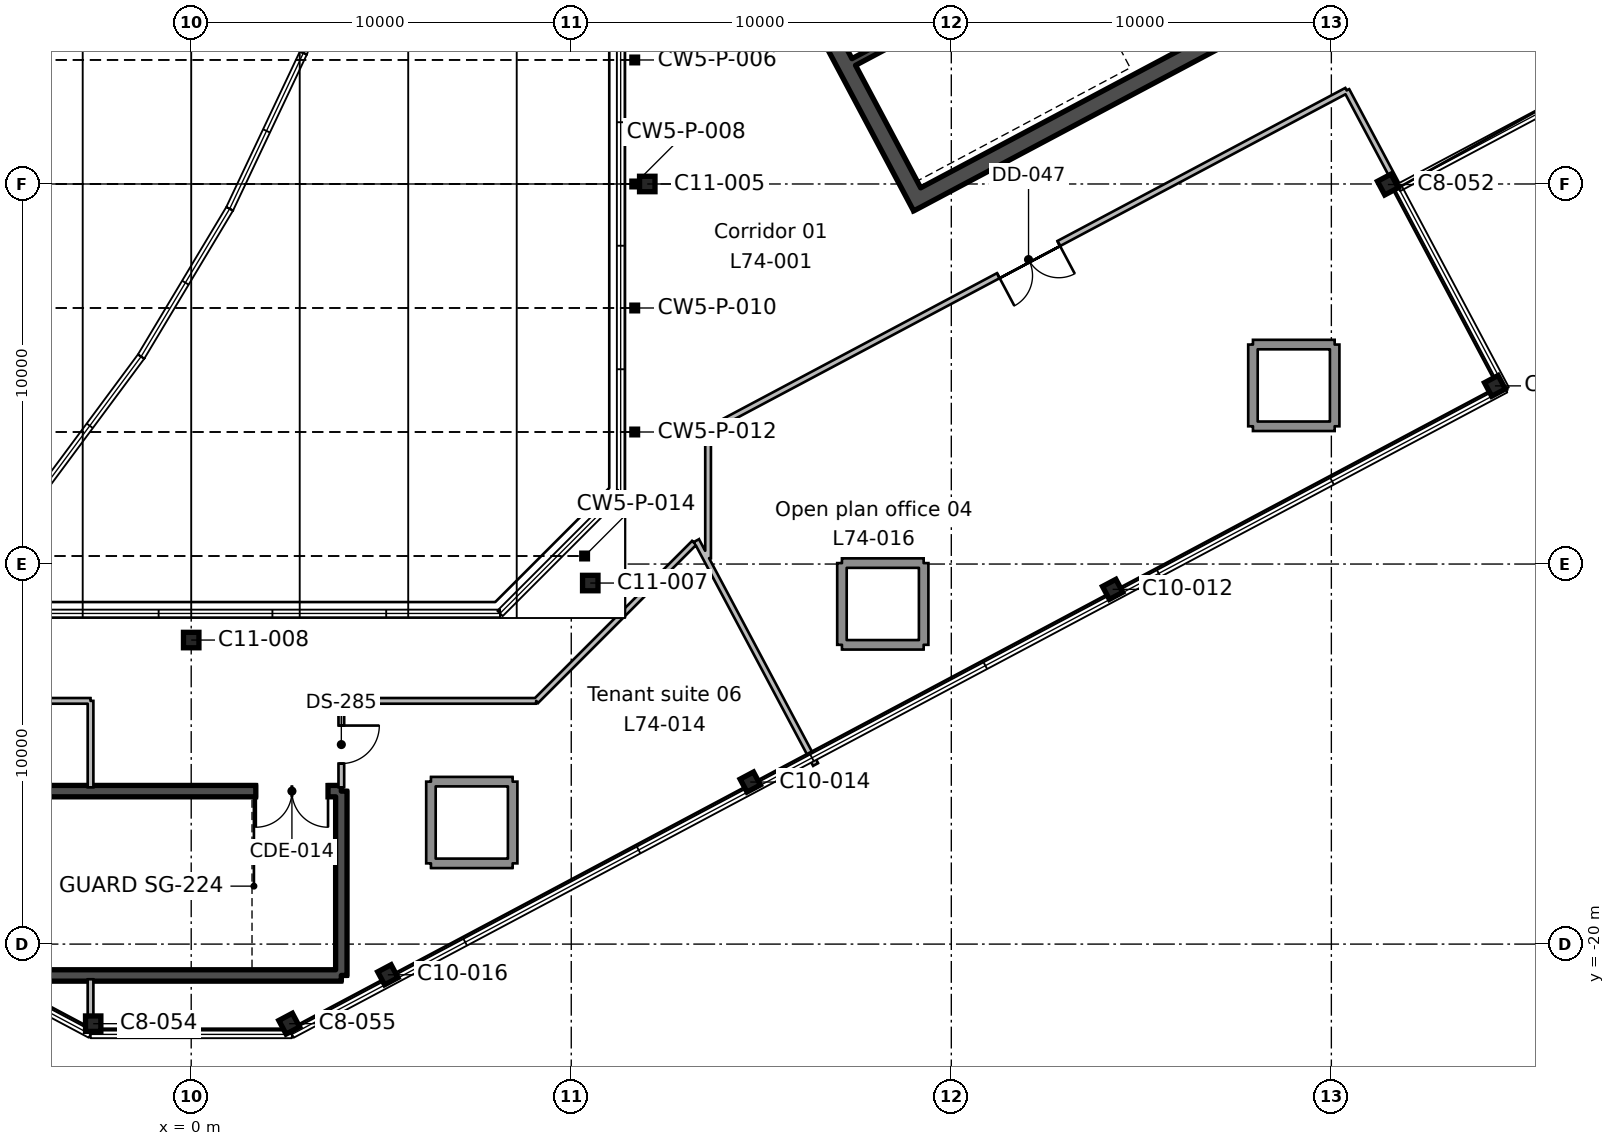
"""IFC4 building model, lengths in metres.
Left out: names, types, materials, properties, quantities, classifications, styles, units other than length and angle.
Written with IfcOpenShell. Run it as: python <this file> out.ifc"""

import sys

from ifc_helpers import new_model, si_unit, direction, frame, frame_2d, origin, origin_2d, place, context, subcontext, project, spatial, rectangle, hollow_rectangle, i_section, extrude, element, fill, save


model = new_model("IFC4")
c1 = context("Model", 3, precision=1e-05, world=origin(), true_north=direction((0.0, 1.0)))
c2 = subcontext(c1, "Body", "Model", "MODEL_VIEW")
j1 = project(units=[si_unit("LENGTHUNIT", "METRE"), si_unit("PLANEANGLEUNIT", "RADIAN")], contexts=[c1])
p1 = place(None, origin())
s1 = spatial("IfcSite", under=j1, at=p1, CompositionType="ELEMENT")
p2 = place(p1, origin())
s2 = spatial("IfcBuilding", under=s1, at=p2, CompositionType="ELEMENT")
p3 = place(p2, frame((0.0, 0.0, 324.3)))
s3 = spatial("IfcBuildingStorey", under=s2, at=p3, CompositionType="ELEMENT", Elevation=324.3)
for number, where, z_axis, x_axis in (
    (1, (-2.579, -22.094, 0.0), (0.0, 0.0, 1.0), (1.0, 0.0, 0.0)),
    (2, (2.579, -22.094, 0.0), (0.0, 0.0, 1.0), (0.883, 0.469, 0.0)),
):
    element("IfcColumn", number, at=place(p3, frame(where, z_axis=z_axis, x_axis=x_axis)), inside=s3, PredefinedType="COLUMN", context=c2, shape_type="SweptSolid", body=[
        extrude(i_section(OverallWidth=0.404, OverallDepth=0.406, WebThickness=0.027, FlangeThickness=0.044, FilletRadius=0.015, at=origin_2d()), origin(), (0.0, 0.0, 1.0), 3.9),
    ])
for number, where, z_axis, x_axis in (
    (3, (5.174, -20.807, 0.0), (0.0, 0.0, 1.0), (0.883, 0.469, 0.0)),
    (4, (14.71, -15.736, 0.0), (0.0, 0.0, 1.0), (0.883, 0.469, 0.0)),
):
    element("IfcColumn", number, at=place(p3, frame(where, z_axis=z_axis, x_axis=x_axis)), inside=s3, PredefinedType="COLUMN", context=c2, shape_type="SweptSolid", body=[
        extrude(i_section(OverallWidth=0.399, OverallDepth=0.386, WebThickness=0.021, FlangeThickness=0.033, FilletRadius=0.015, at=origin_2d()), origin(), (0.0, 0.0, 1.0), 3.9),
    ])
p4 = place(p3, frame((0.0, -12.0, 0.0), z_axis=(0.0, 0.0, 1.0), x_axis=(1.0, 0.0, 0.0)))
e5 = element("IfcColumn", 5, at=p4, inside=s3, PredefinedType="COLUMN", context=c2, shape_type="SweptSolid", body=[
    extrude(hollow_rectangle(XDim=0.406, YDim=0.406, WallThickness=0.009, InnerFilletRadius=0.004, OuterFilletRadius=0.013, at=origin_2d()), origin(), (0.0, 0.0, 1.0), 3.9),
])
p5 = place(p3, frame((24.245, -10.666, 0.0), z_axis=(0.0, 0.0, 1.0), x_axis=(0.882947592859, 0.469471562786, 0.0)))
e6 = element("IfcColumn", 6, at=p5, inside=s3, PredefinedType="COLUMN", context=c2, shape_type="SweptSolid", body=[
    extrude(i_section(OverallWidth=0.399, OverallDepth=0.386, WebThickness=0.021, FlangeThickness=0.033, FilletRadius=0.015, at=origin_2d()), origin(), (0.0, 0.0, 1.0), 3.9),
])
p6 = place(p3, frame((10.5, -10.5, 0.0), z_axis=(0.0, 0.0, 1.0), x_axis=(1.0, 0.0, 0.0)))
e7 = element("IfcColumn", 7, at=p6, inside=s3, PredefinedType="COLUMN", context=c2, shape_type="SweptSolid", body=[
    extrude(hollow_rectangle(XDim=0.406, YDim=0.406, WallThickness=0.009, InnerFilletRadius=0.004, OuterFilletRadius=0.013, at=origin_2d()), origin(), (0.0, 0.0, 1.0), 3.9),
])
for number, where, z_axis, x_axis in (
    (8, (34.304, -5.312, 0.0), (0.0, 0.0, 1.0), (-0.469, 0.883, 0.0)),
    (9, (31.487, -0.014, 0.0), (0.0, 0.0, 1.0), (0.883, 0.469, 0.0)),
):
    element("IfcColumn", number, at=place(p3, frame(where, z_axis=z_axis, x_axis=x_axis)), inside=s3, PredefinedType="COLUMN", context=c2, shape_type="SweptSolid", body=[
        extrude(i_section(OverallWidth=0.404, OverallDepth=0.406, WebThickness=0.027, FlangeThickness=0.044, FilletRadius=0.015, at=origin_2d()), origin(), (0.0, 0.0, 1.0), 3.9),
    ])
p7 = place(p3, frame((12.0, 0.0, 0.0), z_axis=(0.0, 0.0, 1.0), x_axis=(1.0, 0.0, 0.0)))
e10 = element("IfcColumn", 10, at=p7, inside=s3, PredefinedType="COLUMN", context=c2, shape_type="SweptSolid", body=[
    extrude(hollow_rectangle(XDim=0.406, YDim=0.406, WallThickness=0.009, InnerFilletRadius=0.004, OuterFilletRadius=0.013, at=origin_2d()), origin(), (0.0, 0.0, 1.0), 3.9),
])
p8 = place(p3, frame((19.207, -0.604, 0.0), z_axis=(0.0, 0.0, 1.0), x_axis=(-0.469467968382, 0.882949504028, 0.0)))
e11 = element("IfcWall", 11, at=p8, inside=s3, PredefinedType="SHEAR", context=c2, shape_type="SweptSolid", body=[
    extrude(rectangle(XDim=19.1, YDim=0.45, at=frame_2d((9.55, 0.0))), origin(), (0.0, 0.0, 1.0), 3.9),
])
p9 = place(p8, frame((6.55, 0.0, 0.0)))
e12 = element("IfcOpeningElement", 12, at=p9, cuts=e11, PredefinedType="OPENING", context=c2, shape_type="SweptSolid", body=[
    extrude(rectangle(XDim=2.4, YDim=2.4, at=frame_2d((1.2, 1.2))), frame((0.0, 0.235, 0.0), z_axis=(0.0, -1.0, 0.0), x_axis=(1.0, 0.0, 0.0)), (0.0, 0.0, 1.0), 0.47),
])
p10 = place(p3, frame((19.3, -0.299, 0.0), z_axis=(0.0, 0.0, 1.0), x_axis=(0.88295276571, 0.46946183394, 0.0)))
e13 = element("IfcWall", 13, at=p10, inside=s3, PredefinedType="SHEAR", context=c2, shape_type="SweptSolid", body=[
    extrude(rectangle(XDim=20.2, YDim=0.45, at=frame_2d((10.1, 0.0))), origin(), (0.0, 0.0, 1.0), 3.9),
])
p11 = place(p3, frame((17.434, 3.21, 0.0), z_axis=(0.0, 0.0, 1.0), x_axis=(0.882940221191, 0.469485426614, 0.0)))
e14 = element("IfcWall", 14, at=p11, inside=s3, PredefinedType="SHEAR", context=c2, shape_type="SweptSolid", body=[
    extrude(rectangle(XDim=8.0, YDim=0.2, at=frame_2d((4.0, 0.0))), origin(), (0.0, 0.0, 1.0), 3.9),
])
p12 = place(p3, frame((3.95, -15.975, 0.0), z_axis=(0.0, 0.0, 1.0), x_axis=(0.0, -1.0, 0.0)))
e15 = element("IfcWall", 15, at=p12, inside=s3, PredefinedType="SHEAR", context=c2, shape_type="SweptSolid", body=[
    extrude(rectangle(XDim=4.85, YDim=0.3, at=frame_2d((2.425, 0.0))), origin(), (0.0, 0.0, 1.0), 3.9),
])
p13 = place(p3, frame((3.95, -20.825, 0.0), z_axis=(0.0, 0.0, 1.0), x_axis=(-1.0, 0.0, 0.0)))
e16 = element("IfcWall", 16, at=p13, inside=s3, PredefinedType="SHEAR", context=c2, shape_type="SweptSolid", body=[
    extrude(rectangle(XDim=8.3, YDim=0.3, at=frame_2d((4.15, 0.0))), origin(), (0.0, 0.0, 1.0), 3.9),
])
p14 = place(p3, frame((-4.35, -15.975, 0.0), z_axis=(0.0, 0.0, 1.0), x_axis=(1.0, 0.0, 0.0)))
e17 = element("IfcWall", 17, at=p14, inside=s3, PredefinedType="SHEAR", context=c2, shape_type="SweptSolid", body=[
    extrude(rectangle(XDim=8.3, YDim=0.3, at=frame_2d((4.15, 0.0))), origin(), (0.0, 0.0, 1.0), 3.9),
])
p15 = place(p14, frame((6.05, 0.0, 0.0)))
e18 = element("IfcOpeningElement", 18, at=p15, cuts=e17, PredefinedType="OPENING", context=c2, shape_type="SweptSolid", body=[
    extrude(rectangle(XDim=1.9, YDim=2.1, at=frame_2d((0.95, 1.05))), frame((0.0, 0.16, 0.0), z_axis=(0.0, -1.0, 0.0), x_axis=(1.0, 0.0, 0.0)), (0.0, 0.0, 1.0), 0.32),
])
p16 = place(p3, frame((8.458, -15.726, 3.9), z_axis=(0.0, 0.0, 1.0), x_axis=(0.0, -1.0, 0.0)))
e19 = element("IfcWall", 19, at=p16, inside=s3, PredefinedType="STANDARD", context=c2, shape_type="SweptSolid", body=[
    extrude(rectangle(XDim=2.15, YDim=0.25, at=frame_2d((1.075, 0.0))), origin(), (0.0, 0.0, 1.0), 0.6),
])
p17 = place(p3, frame((8.458, -17.875, 3.9), z_axis=(0.0, 0.0, 1.0), x_axis=(-1.0, 0.0, 0.0)))
e20 = element("IfcWall", 20, at=p17, inside=s3, PredefinedType="STANDARD", context=c2, shape_type="SweptSolid", body=[
    extrude(rectangle(XDim=2.15, YDim=0.25, at=frame_2d((1.075, 0.0))), origin(), (0.0, 0.0, 1.0), 0.6),
])
p18 = place(p3, frame((6.308, -17.875, 3.9), z_axis=(0.0, 0.0, 1.0), x_axis=(0.0, 1.0, 0.0)))
e21 = element("IfcWall", 21, at=p18, inside=s3, PredefinedType="STANDARD", context=c2, shape_type="SweptSolid", body=[
    extrude(rectangle(XDim=2.15, YDim=0.25, at=frame_2d((1.075, 0.0))), origin(), (0.0, 0.0, 1.0), 0.6),
])
p19 = place(p3, frame((6.308, -15.726, 3.9), z_axis=(0.0, 0.0, 1.0), x_axis=(1.0, 0.0, 0.0)))
e22 = element("IfcWall", 22, at=p19, inside=s3, PredefinedType="STANDARD", context=c2, shape_type="SweptSolid", body=[
    extrude(rectangle(XDim=2.15, YDim=0.25, at=frame_2d((1.075, 0.0))), origin(), (0.0, 0.0, 1.0), 0.6),
])
p20 = place(p3, frame((19.272, -9.975, 3.9), z_axis=(0.0, 0.0, 1.0), x_axis=(0.0, -1.0, 0.0)))
e23 = element("IfcWall", 23, at=p20, inside=s3, PredefinedType="STANDARD", context=c2, shape_type="SweptSolid", body=[
    extrude(rectangle(XDim=2.15, YDim=0.25, at=frame_2d((1.075, 0.0))), origin(), (0.0, 0.0, 1.0), 0.6),
])
p21 = place(p3, frame((19.272, -12.125, 3.9), z_axis=(0.0, 0.0, 1.0), x_axis=(-1.0, 0.0, 0.0)))
e24 = element("IfcWall", 24, at=p21, inside=s3, PredefinedType="STANDARD", context=c2, shape_type="SweptSolid", body=[
    extrude(rectangle(XDim=2.15, YDim=0.25, at=frame_2d((1.075, 0.0))), origin(), (0.0, 0.0, 1.0), 0.6),
])
p22 = place(p3, frame((17.122, -12.125, 3.9), z_axis=(0.0, 0.0, 1.0), x_axis=(0.0, 1.0, 0.0)))
e25 = element("IfcWall", 25, at=p22, inside=s3, PredefinedType="STANDARD", context=c2, shape_type="SweptSolid", body=[
    extrude(rectangle(XDim=2.15, YDim=0.25, at=frame_2d((1.075, 0.0))), origin(), (0.0, 0.0, 1.0), 0.6),
])
p23 = place(p3, frame((17.122, -9.975, 3.9), z_axis=(0.0, 0.0, 1.0), x_axis=(1.0, 0.0, 0.0)))
e26 = element("IfcWall", 26, at=p23, inside=s3, PredefinedType="STANDARD", context=c2, shape_type="SweptSolid", body=[
    extrude(rectangle(XDim=2.15, YDim=0.25, at=frame_2d((1.075, 0.0))), origin(), (0.0, 0.0, 1.0), 0.6),
])
for number, where, z_axis, x_axis in (
    (27, (30.087, -4.225, 3.9), (0.0, 0.0, 1.0), (0.0, -1.0, 0.0)),
    (28, (30.087, -6.375, 3.9), (0.0, 0.0, 1.0), (-1.0, 0.0, 0.0)),
    (29, (27.937, -6.375, 3.9), (0.0, 0.0, 1.0), (0.0, 1.0, 0.0)),
    (30, (27.937, -4.225, 3.9), (0.0, 0.0, 1.0), (1.0, 0.0, 0.0)),
):
    element("IfcWall", number, at=place(p3, frame(where, z_axis=z_axis, x_axis=x_axis)), inside=s3, PredefinedType="STANDARD", context=c2, shape_type="SweptSolid", body=[
        extrude(rectangle(XDim=2.15, YDim=0.25, at=frame_2d((1.075, 0.0))), origin(), (0.0, 0.0, 1.0), 0.6),
    ])
p24 = place(p3, frame((11.1, 8.042, 3.9), z_axis=(0.0, 0.0, 1.0), x_axis=(0.0, -1.0, 0.0)))
e31 = element("IfcWall", 31, at=p24, inside=s3, PredefinedType="STANDARD", context=c2, shape_type="SweptSolid", body=[
    extrude(rectangle(XDim=16.083, YDim=0.2, at=frame_2d((8.042, 0.0))), origin(), (0.0, 0.0, 1.0), 1.1),
])
p25 = place(p3, frame((11.1, -8.042, 3.9), z_axis=(0.0, 0.0, 1.0), x_axis=(-0.707106781187, -0.707106781187, 0.0)))
e32 = element("IfcWall", 32, at=p25, inside=s3, PredefinedType="STANDARD", context=c2, shape_type="SweptSolid", body=[
    extrude(rectangle(XDim=4.325, YDim=0.2, at=frame_2d((2.163, 0.0))), origin(), (0.0, 0.0, 1.0), 1.1),
])
p26 = place(p3, frame((8.042, -11.1, 3.9), z_axis=(0.0, 0.0, 1.0), x_axis=(-1.0, 0.0, 0.0)))
e33 = element("IfcWall", 33, at=p26, inside=s3, PredefinedType="STANDARD", context=c2, shape_type="SweptSolid", body=[
    extrude(rectangle(XDim=14.435, YDim=0.2, at=frame_2d((7.217, 0.0))), origin(), (0.0, 0.0, 1.0), 1.1),
])
p27 = place(p3, frame((-3.865, -8.31, 3.9), z_axis=(0.0, 0.0, 1.0), x_axis=(0.595701892523, 0.80320561206, 0.0)))
e34 = element("IfcWall", 34, at=p27, inside=s3, PredefinedType="STANDARD", context=c2, shape_type="SweptSolid", body=[
    extrude(rectangle(XDim=4.553, YDim=0.2, at=frame_2d((2.277, 0.0))), origin(), (0.0, 0.0, 1.0), 1.1),
])
p28 = place(p3, frame((-1.152, -4.653, 3.9), z_axis=(0.0, 0.0, 1.0), x_axis=(0.514109363487, 0.857724642514, 0.0)))
e35 = element("IfcWall", 35, at=p28, inside=s3, PredefinedType="STANDARD", context=c2, shape_type="SweptSolid", body=[
    extrude(rectangle(XDim=4.554, YDim=0.2, at=frame_2d((2.277, 0.0))), origin(), (0.0, 0.0, 1.0), 1.1),
])
p29 = place(p3, frame((1.189, -0.747, 3.9), z_axis=(0.0, 0.0, 1.0), x_axis=(0.427546938285, 0.903993150175, 0.0)))
e36 = element("IfcWall", 36, at=p29, inside=s3, PredefinedType="STANDARD", context=c2, shape_type="SweptSolid", body=[
    extrude(rectangle(XDim=4.553, YDim=0.2, at=frame_2d((2.277, 0.0))), origin(), (0.0, 0.0, 1.0), 1.1),
])
p30 = place(p3, frame((3.136, 3.369, 3.9), z_axis=(0.0, 0.0, 1.0), x_axis=(0.336900115649, 0.941540393226, 0.0)))
e37 = element("IfcWall", 37, at=p30, inside=s3, PredefinedType="STANDARD", context=c2, shape_type="SweptSolid", body=[
    extrude(rectangle(XDim=4.554, YDim=0.2, at=frame_2d((2.277, 0.0))), origin(), (0.0, 0.0, 1.0), 1.1),
])
for number, where, z_axis, x_axis in (
    (38, (10.351, -9.789, 3.9), (0.0, 0.0, 1.0), (1.0, 0.0, 0.0)),
    (39, (11.67, -6.526, 3.9), (0.0, 0.0, 1.0), (1.0, 0.0, 0.0)),
    (40, (11.67, -3.263, 3.9), (0.0, 0.0, 1.0), (1.0, 0.0, 0.0)),
    (41, (11.67, 0.0, 3.9), (0.0, 0.0, 1.0), (1.0, 0.0, 0.0)),
    (42, (11.67, 3.263, 3.9), (0.0, 0.0, 1.0), (1.0, 0.0, 0.0)),
):
    element("IfcColumn", number, at=place(p3, frame(where, z_axis=z_axis, x_axis=x_axis)), inside=s3, PredefinedType="COLUMN", context=c2, shape_type="SweptSolid", body=[
        extrude(hollow_rectangle(XDim=0.15, YDim=0.15, WallThickness=0.008, InnerFilletRadius=0.004, OuterFilletRadius=0.012, at=origin_2d()), origin(), (0.0, 0.0, 1.0), 2.45),
    ])
p31 = place(p3, frame((-2.649, -15.875, 0.0), z_axis=(0.0, 0.0, 1.0), x_axis=(0.0, 1.0, 0.0)))
e43 = element("IfcWall", 43, at=p31, inside=s3, PredefinedType="PARTITIONING", context=c2, shape_type="SweptSolid", body=[
    extrude(rectangle(XDim=2.275, YDim=0.15, at=frame_2d((1.137, 0.0))), origin(), (0.0, 0.0, 1.0), 3.5),
])
p32 = place(p3, frame((-2.649, -13.6, 0.0), z_axis=(0.0, 0.0, 1.0), x_axis=(-1.0, 0.0, 0.0)))
e44 = element("IfcWall", 44, at=p32, inside=s3, PredefinedType="PARTITIONING", context=c2, shape_type="SweptSolid", body=[
    extrude(rectangle(XDim=1.239, YDim=0.15, at=frame_2d((0.62, 0.0))), origin(), (0.0, 0.0, 1.0), 3.5),
])
p33 = place(p3, frame((-2.649, -20.925, 0.0), z_axis=(0.0, 0.0, 1.0), x_axis=(0.0, -1.0, 0.0)))
e45 = element("IfcWall", 45, at=p33, inside=s3, PredefinedType="PARTITIONING", context=c2, shape_type="SweptSolid", body=[
    extrude(rectangle(XDim=0.966, YDim=0.15, at=frame_2d((0.483, 0.0))), origin(), (0.0, 0.0, 1.0), 3.5),
])
p34 = place(p3, frame((3.95, -13.6, 0.0), z_axis=(0.0, 0.0, 1.0), x_axis=(0.0, -1.0, 0.0)))
e46 = element("IfcWall", 46, at=p34, inside=s3, PredefinedType="PARTITIONING", context=c2, shape_type="SweptSolid", body=[
    extrude(rectangle(XDim=2.275, YDim=0.15, at=frame_2d((1.137, 0.0))), origin(), (0.0, 0.0, 1.0), 3.5),
])
p35 = place(p34, frame((0.65, 0.0, 0.0)))
e47 = element("IfcOpeningElement", 47, at=p35, cuts=e46, PredefinedType="OPENING", context=c2, shape_type="SweptSolid", body=[
    extrude(rectangle(XDim=1.0, YDim=2.1, at=frame_2d((0.5, 1.05))), frame((0.0, 0.085, 0.0), z_axis=(0.0, -1.0, 0.0), x_axis=(1.0, 0.0, 0.0)), (0.0, 0.0, 1.0), 0.17),
])
p36 = place(p3, frame((13.233, -9.444, 0.0), z_axis=(0.0, 0.0, 1.0), x_axis=(-0.707106781187, -0.707106781187, 0.0)))
e48 = element("IfcWall", 48, at=p36, inside=s3, PredefinedType="PARTITIONING", context=c2, shape_type="SweptSolid", body=[
    extrude(rectangle(XDim=5.877, YDim=0.15, at=frame_2d((2.939, 0.0))), origin(), (0.0, 0.0, 1.0), 3.5),
])
p37 = place(p3, frame((9.077, -13.6, 0.0), z_axis=(0.0, 0.0, 1.0), x_axis=(-1.0, 0.0, 0.0)))
e49 = element("IfcWall", 49, at=p37, inside=s3, PredefinedType="PARTITIONING", context=c2, shape_type="SweptSolid", body=[
    extrude(rectangle(XDim=5.052, YDim=0.15, at=frame_2d((2.526, 0.0))), origin(), (0.0, 0.0, 1.0), 3.5),
])
p38 = place(p3, frame((13.295, -9.382, 0.0), z_axis=(0.0, 0.0, 1.0), x_axis=(0.469560801687, -0.882900137908, 0.0)))
e50 = element("IfcWall", 50, at=p38, inside=s3, PredefinedType="PARTITIONING", context=c2, shape_type="SweptSolid", body=[
    extrude(rectangle(XDim=6.674, YDim=0.15, at=frame_2d((3.337, 0.0))), origin(), (0.0, 0.0, 1.0), 3.5),
])
p39 = place(p3, frame((13.6, -6.473, 0.0), z_axis=(0.0, 0.0, 1.0), x_axis=(0.0, -1.0, 0.0)))
e51 = element("IfcWall", 51, at=p39, inside=s3, PredefinedType="PARTITIONING", context=c2, shape_type="SweptSolid", body=[
    extrude(rectangle(XDim=3.373, YDim=0.15, at=frame_2d((1.687, 0.0))), origin(), (0.0, 0.0, 1.0), 3.5),
])
p40 = place(p3, frame((13.6, -6.473, 0.0), z_axis=(0.0, 0.0, 1.0), x_axis=(0.882936434037, 0.469492548877, 0.0)))
e52 = element("IfcWall", 52, at=p40, inside=s3, PredefinedType="PARTITIONING", context=c2, shape_type="SweptSolid", body=[
    extrude(rectangle(XDim=19.031, YDim=0.15, at=frame_2d((9.515, 0.0))), origin(), (0.0, 0.0, 1.0), 3.5),
])
p41 = place(p40, frame((8.65, 0.0, 0.0)))
e53 = element("IfcOpeningElement", 53, at=p41, cuts=e52, PredefinedType="OPENING", context=c2, shape_type="SweptSolid", body=[
    extrude(rectangle(XDim=1.8, YDim=2.1, at=frame_2d((0.9, 1.05))), frame((0.0, 0.085, 0.0), z_axis=(0.0, -1.0, 0.0), x_axis=(1.0, 0.0, 0.0)), (0.0, 0.0, 1.0), 0.17),
])
p42 = place(p3, frame((30.403, 2.462, 0.0), z_axis=(0.0, 0.0, 1.0), x_axis=(0.469572246647, -0.882894050936, 0.0)))
e54 = element("IfcWall", 54, at=p42, inside=s3, PredefinedType="PARTITIONING", context=c2, shape_type="SweptSolid", body=[
    extrude(rectangle(XDim=3.181, YDim=0.15, at=frame_2d((1.591, 0.0))), origin(), (0.0, 0.0, 1.0), 3.5),
])
p43 = place(p15, frame((1.9, 0.0, 0.0), z_axis=(0.0, 0.0, 1.0), x_axis=(-1.0, 0.0, 0.0)))
e55 = element("IfcDoor", 55, at=p43, inside=s3, OperationType="DOUBLE_DOOR_SINGLE_SWING", PredefinedType="DOOR", context=c2, shape_type="SweptSolid", body=[
    extrude(rectangle(XDim=1.9, YDim=2.1, at=frame_2d((0.95, 1.05))), frame((0.0, 0.025, 0.0), z_axis=(0.0, -1.0, 0.0), x_axis=(1.0, 0.0, 0.0)), (0.0, 0.0, 1.0), 0.05),
])
fill(e18, e55)
p44 = place(p35, origin())
e56 = element("IfcDoor", 56, at=p44, inside=s3, OperationType="SINGLE_SWING_LEFT", PredefinedType="DOOR", context=c2, shape_type="SweptSolid", body=[
    extrude(rectangle(XDim=1.0, YDim=2.1, at=frame_2d((0.5, 1.05))), frame((0.0, 0.025, 0.0), z_axis=(0.0, -1.0, 0.0), x_axis=(1.0, 0.0, 0.0)), (0.0, 0.0, 1.0), 0.05),
])
fill(e47, e56)
p45 = place(p41, frame((1.8, 0.0, 0.0), z_axis=(0.0, 0.0, 1.0), x_axis=(-1.0, 0.0, 0.0)))
e57 = element("IfcDoor", 57, at=p45, inside=s3, OperationType="DOUBLE_DOOR_SINGLE_SWING", PredefinedType="DOOR", context=c2, shape_type="SweptSolid", body=[
    extrude(rectangle(XDim=1.8, YDim=2.1, at=frame_2d((0.9, 1.05))), frame((0.0, 0.025, 0.0), z_axis=(0.0, -1.0, 0.0), x_axis=(1.0, 0.0, 0.0)), (0.0, 0.0, 1.0), 0.05),
])
fill(e53, e57)
save(model, sys.argv[1])
